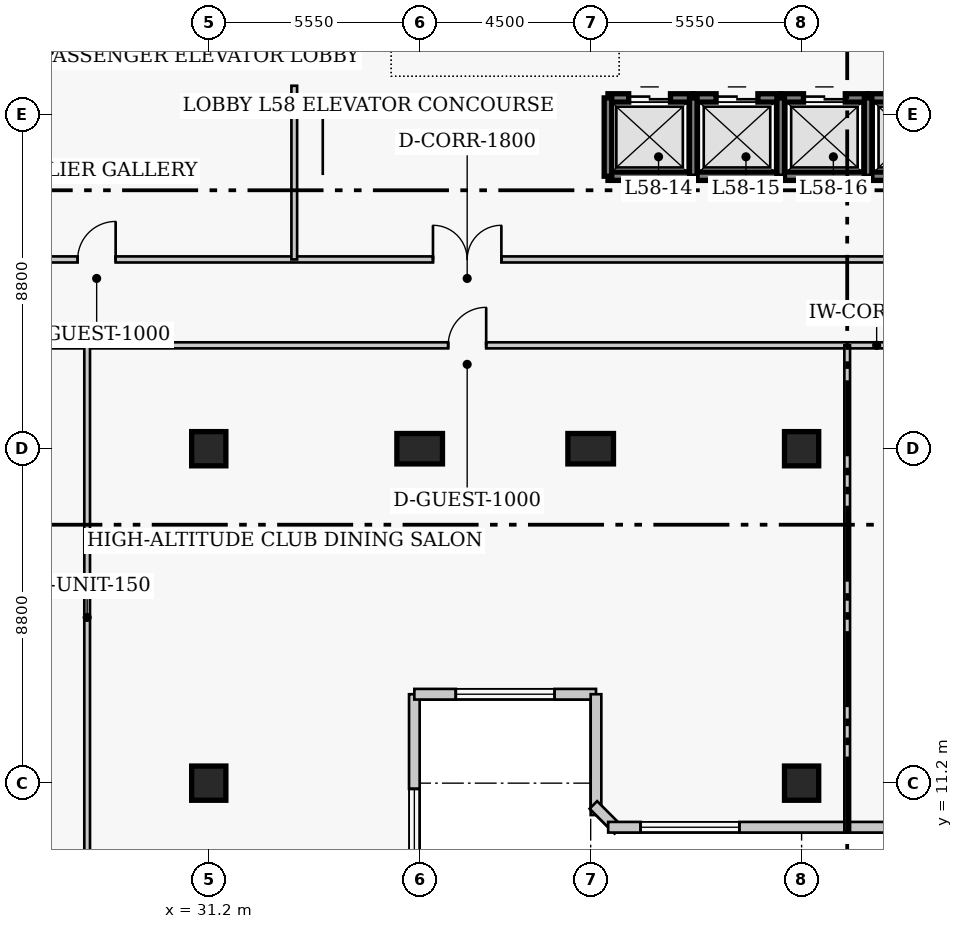
"""IFC4 building model, lengths in metres.
Left out: names, types, materials, properties, quantities, classifications, styles, units other than length and angle.
Written with IfcOpenShell. Run it as: python <this file> out.ifc"""

import sys

from ifc_helpers import new_model, si_unit, direction, frame, frame_2d, origin, origin_2d, place, context, subcontext, project, spatial, rectangle, extrude, element, fill, save


model = new_model("IFC4")
c1 = context("Model", 3, precision=1e-05, world=origin(), true_north=direction((0.0, 1.0)))
c2 = subcontext(c1, "Body", "Model", "MODEL_VIEW")
j1 = project(units=[si_unit("LENGTHUNIT", "METRE"), si_unit("PLANEANGLEUNIT", "RADIAN")], contexts=[c1])
p1 = place(None, origin())
s1 = spatial("IfcSite", under=j1, at=p1, CompositionType="ELEMENT")
p2 = place(p1, origin())
s2 = spatial("IfcBuilding", under=s1, at=p2, CompositionType="ELEMENT")
p3 = place(p2, frame((0.0, 0.0, 231.9)))
s3 = spatial("IfcBuildingStorey", under=s2, at=p3, CompositionType="ELEMENT", Elevation=231.9)
for number, where, z_axis, x_axis in (
    (1, (31.2, 11.2, 0.0), (0.0, 0.0, 1.0), (1.0, 0.0, 0.0)),
    (2, (31.2, 20.0, 0.0), (0.0, 0.0, 1.0), (1.0, 0.0, 0.0)),
):
    element("IfcColumn", number, at=place(p3, frame(where, z_axis=z_axis, x_axis=x_axis)), inside=s3, PredefinedType="COLUMN", context=c2, shape_type="SweptSolid", body=[
        extrude(rectangle(XDim=0.9, YDim=0.9, at=origin_2d()), origin(), (0.0, 0.0, 1.0), 4.6),
    ])
for number, where, z_axis, x_axis in (
    (3, (36.75, 20.0, 0.0), (0.0, 0.0, 1.0), (1.0, 0.0, 0.0)),
    (4, (41.25, 20.0, 0.0), (0.0, 0.0, 1.0), (1.0, 0.0, 0.0)),
):
    element("IfcColumn", number, at=place(p3, frame(where, z_axis=z_axis, x_axis=x_axis)), inside=s3, PredefinedType="COLUMN", context=c2, shape_type="SweptSolid", body=[
        extrude(rectangle(XDim=1.2, YDim=0.8, at=origin_2d()), origin(), (0.0, 0.0, 1.0), 4.6),
    ])
for number, where, z_axis, x_axis in (
    (5, (46.8, 11.2, 0.0), (0.0, 0.0, 1.0), (1.0, 0.0, 0.0)),
    (6, (46.8, 20.0, 0.0), (0.0, 0.0, 1.0), (1.0, 0.0, 0.0)),
):
    element("IfcColumn", number, at=place(p3, frame(where, z_axis=z_axis, x_axis=x_axis)), inside=s3, PredefinedType="COLUMN", context=c2, shape_type="SweptSolid", body=[
        extrude(rectangle(XDim=0.9, YDim=0.9, at=origin_2d()), origin(), (0.0, 0.0, 1.0), 4.6),
    ])
p4 = place(p3, frame((36.61, 5.96, 0.0), z_axis=(0.0, 0.0, 1.0), x_axis=(0.0, 1.0, 0.0)))
e7 = element("IfcWall", 7, at=p4, inside=s3, PredefinedType="SOLIDWALL", context=c2, shape_type="SweptSolid", body=[
    extrude(rectangle(XDim=7.58, YDim=0.28, at=frame_2d((3.79, 0.0))), origin(), (0.0, 0.0, 1.0), 4.35),
])
p5 = place(p4, frame((2.49, 0.0, 0.65)))
e8 = element("IfcOpeningElement", 8, at=p5, cuts=e7, PredefinedType="OPENING", context=c2, shape_type="SweptSolid", body=[
    extrude(rectangle(XDim=2.6, YDim=2.2, at=frame_2d((1.3, 1.1))), frame((0.0, 0.15, 0.0), z_axis=(0.0, -1.0, 0.0), x_axis=(1.0, 0.0, 0.0)), (0.0, 0.0, 1.0), 0.3),
])
p6 = place(p3, frame((36.61, 13.54, 0.0), z_axis=(0.0, 0.0, 1.0), x_axis=(1.0, 0.0, 0.0)))
e9 = element("IfcWall", 9, at=p6, inside=s3, PredefinedType="SOLIDWALL", context=c2, shape_type="SweptSolid", body=[
    extrude(rectangle(XDim=4.78, YDim=0.28, at=frame_2d((2.39, 0.0))), origin(), (0.0, 0.0, 1.0), 4.35),
])
p7 = place(p6, frame((1.09, 0.0, 0.65)))
e10 = element("IfcOpeningElement", 10, at=p7, cuts=e9, PredefinedType="OPENING", context=c2, shape_type="SweptSolid", body=[
    extrude(rectangle(XDim=2.6, YDim=2.2, at=frame_2d((1.3, 1.1))), frame((0.0, 0.15, 0.0), z_axis=(0.0, -1.0, 0.0), x_axis=(1.0, 0.0, 0.0)), (0.0, 0.0, 1.0), 0.3),
])
p8 = place(p3, frame((41.39, 13.54, 0.0), z_axis=(0.0, 0.0, 1.0), x_axis=(0.0, -1.0, 0.0)))
e11 = element("IfcWall", 11, at=p8, inside=s3, PredefinedType="SOLIDWALL", context=c2, shape_type="SweptSolid", body=[
    extrude(rectangle(XDim=3.18, YDim=0.28, at=frame_2d((1.59, 0.0))), origin(), (0.0, 0.0, 1.0), 4.35),
])
p9 = place(p3, frame((41.321, 10.627, 0.0), z_axis=(0.0, 0.0, 1.0), x_axis=(0.707106781187, -0.707106781187, 0.0)))
e12 = element("IfcWall", 12, at=p9, inside=s3, PredefinedType="SOLIDWALL", context=c2, shape_type="SweptSolid", body=[
    extrude(rectangle(XDim=0.928, YDim=0.28, at=frame_2d((0.464, 0.0))), origin(), (0.0, 0.0, 1.0), 4.35),
])
p10 = place(p3, frame((41.71, 10.04, 0.0), z_axis=(0.0, 0.0, 1.0), x_axis=(1.0, 0.0, 0.0)))
e13 = element("IfcWall", 13, at=p10, inside=s3, PredefinedType="SOLIDWALL", context=c2, shape_type="SweptSolid", body=[
    extrude(rectangle(XDim=25.83, YDim=0.28, at=frame_2d((12.915, 0.0))), origin(), (0.0, 0.0, 1.0), 4.35),
])
p11 = place(p10, frame((0.853, 0.0, 0.65)))
e14 = element("IfcOpeningElement", 14, at=p11, cuts=e13, PredefinedType="OPENING", context=c2, shape_type="SweptSolid", body=[
    extrude(rectangle(XDim=2.6, YDim=2.2, at=frame_2d((1.3, 1.1))), frame((0.0, 0.15, 0.0), z_axis=(0.0, -1.0, 0.0), x_axis=(1.0, 0.0, 0.0)), (0.0, 0.0, 1.0), 0.3),
])
p12 = place(p10, frame((9.462, 0.0, 0.65)))
e15 = element("IfcOpeningElement", 15, at=p12, cuts=e13, PredefinedType="OPENING", context=c2, shape_type="SweptSolid", body=[
    extrude(rectangle(XDim=2.6, YDim=2.2, at=frame_2d((1.3, 1.1))), frame((0.0, 0.15, 0.0), z_axis=(0.0, -1.0, 0.0), x_axis=(1.0, 0.0, 0.0)), (0.0, 0.0, 1.0), 0.3),
])
p13 = place(p10, frame((13.768, 0.0, 0.65)))
e16 = element("IfcOpeningElement", 16, at=p13, cuts=e13, PredefinedType="OPENING", context=c2, shape_type="SweptSolid", body=[
    extrude(rectangle(XDim=2.6, YDim=2.2, at=frame_2d((1.3, 1.1))), frame((0.0, 0.15, 0.0), z_axis=(0.0, -1.0, 0.0), x_axis=(1.0, 0.0, 0.0)), (0.0, 0.0, 1.0), 0.3),
])
p14 = place(p10, frame((16.923, 0.0, 0.65)))
e17 = element("IfcOpeningElement", 17, at=p14, cuts=e13, PredefinedType="OPENING", context=c2, shape_type="SweptSolid", body=[
    extrude(rectangle(XDim=2.6, YDim=2.2, at=frame_2d((1.3, 1.1))), frame((0.0, 0.15, 0.0), z_axis=(0.0, -1.0, 0.0), x_axis=(1.0, 0.0, 0.0)), (0.0, 0.0, 1.0), 0.3),
])
p15 = place(p10, frame((22.377, 0.0, 0.65)))
e18 = element("IfcOpeningElement", 18, at=p15, cuts=e13, PredefinedType="OPENING", context=c2, shape_type="SweptSolid", body=[
    extrude(rectangle(XDim=2.6, YDim=2.2, at=frame_2d((1.3, 1.1))), frame((0.0, 0.15, 0.0), z_axis=(0.0, -1.0, 0.0), x_axis=(1.0, 0.0, 0.0)), (0.0, 0.0, 1.0), 0.3),
])
p16 = place(p3, frame((41.705, 29.23, 0.0), z_axis=(0.0, 0.0, 1.0), x_axis=(1.0, 0.0, 0.0)))
e19 = element("IfcWall", 19, at=p16, inside=s3, PredefinedType="SHEAR", context=c2, shape_type="SweptSolid", body=[
    extrude(rectangle(XDim=2.245, YDim=0.22, at=frame_2d((1.123, 0.0))), origin(), (0.0, 0.0, 1.0), 4.6),
])
p17 = place(p16, frame((0.545, 0.0, 0.0)))
e20 = element("IfcOpeningElement", 20, at=p17, cuts=e19, PredefinedType="OPENING", context=c2, shape_type="SweptSolid", body=[
    extrude(rectangle(XDim=1.1, YDim=2.15, at=frame_2d((0.55, 1.075))), frame((0.0, 0.12, 0.0), z_axis=(0.0, -1.0, 0.0), x_axis=(1.0, 0.0, 0.0)), (0.0, 0.0, 1.0), 0.24),
])
p18 = place(p3, frame((41.705, 27.17, 0.0), z_axis=(0.0, 0.0, 1.0), x_axis=(1.0, 0.0, 0.0)))
e21 = element("IfcWall", 21, at=p18, inside=s3, PredefinedType="SHEAR", context=c2, shape_type="SweptSolid", body=[
    extrude(rectangle(XDim=2.245, YDim=0.22, at=frame_2d((1.123, 0.0))), origin(), (0.0, 0.0, 1.0), 4.6),
])
p19 = place(p3, frame((41.705, 27.17, 0.0), z_axis=(0.0, 0.0, 1.0), x_axis=(0.0, 1.0, 0.0)))
e22 = element("IfcWall", 22, at=p19, inside=s3, PredefinedType="SHEAR", context=c2, shape_type="SweptSolid", body=[
    extrude(rectangle(XDim=2.06, YDim=0.2, at=frame_2d((1.03, 0.0))), origin(), (0.0, 0.0, 1.0), 4.6),
])
p20 = place(p3, frame((43.95, 29.23, 0.0), z_axis=(0.0, 0.0, 1.0), x_axis=(1.0, 0.0, 0.0)))
e23 = element("IfcWall", 23, at=p20, inside=s3, PredefinedType="SHEAR", context=c2, shape_type="SweptSolid", body=[
    extrude(rectangle(XDim=2.3, YDim=0.22, at=frame_2d((1.15, 0.0))), origin(), (0.0, 0.0, 1.0), 4.6),
])
p21 = place(p20, frame((0.6, 0.0, 0.0)))
e24 = element("IfcOpeningElement", 24, at=p21, cuts=e23, PredefinedType="OPENING", context=c2, shape_type="SweptSolid", body=[
    extrude(rectangle(XDim=1.1, YDim=2.15, at=frame_2d((0.55, 1.075))), frame((0.0, 0.12, 0.0), z_axis=(0.0, -1.0, 0.0), x_axis=(1.0, 0.0, 0.0)), (0.0, 0.0, 1.0), 0.24),
])
p22 = place(p3, frame((43.95, 27.17, 0.0), z_axis=(0.0, 0.0, 1.0), x_axis=(1.0, 0.0, 0.0)))
e25 = element("IfcWall", 25, at=p22, inside=s3, PredefinedType="SHEAR", context=c2, shape_type="SweptSolid", body=[
    extrude(rectangle(XDim=2.3, YDim=0.22, at=frame_2d((1.15, 0.0))), origin(), (0.0, 0.0, 1.0), 4.6),
])
p23 = place(p3, frame((43.95, 27.17, 0.0), z_axis=(0.0, 0.0, 1.0), x_axis=(0.0, 1.0, 0.0)))
e26 = element("IfcWall", 26, at=p23, inside=s3, PredefinedType="SHEAR", context=c2, shape_type="SweptSolid", body=[
    extrude(rectangle(XDim=2.06, YDim=0.2, at=frame_2d((1.03, 0.0))), origin(), (0.0, 0.0, 1.0), 4.6),
])
p24 = place(p3, frame((46.25, 29.23, 0.0), z_axis=(0.0, 0.0, 1.0), x_axis=(1.0, 0.0, 0.0)))
e27 = element("IfcWall", 27, at=p24, inside=s3, PredefinedType="SHEAR", context=c2, shape_type="SweptSolid", body=[
    extrude(rectangle(XDim=2.3, YDim=0.22, at=frame_2d((1.15, 0.0))), origin(), (0.0, 0.0, 1.0), 4.6),
])
p25 = place(p24, frame((0.6, 0.0, 0.0)))
e28 = element("IfcOpeningElement", 28, at=p25, cuts=e27, PredefinedType="OPENING", context=c2, shape_type="SweptSolid", body=[
    extrude(rectangle(XDim=1.1, YDim=2.15, at=frame_2d((0.55, 1.075))), frame((0.0, 0.12, 0.0), z_axis=(0.0, -1.0, 0.0), x_axis=(1.0, 0.0, 0.0)), (0.0, 0.0, 1.0), 0.24),
])
p26 = place(p3, frame((46.25, 27.17, 0.0), z_axis=(0.0, 0.0, 1.0), x_axis=(1.0, 0.0, 0.0)))
e29 = element("IfcWall", 29, at=p26, inside=s3, PredefinedType="SHEAR", context=c2, shape_type="SweptSolid", body=[
    extrude(rectangle(XDim=2.3, YDim=0.22, at=frame_2d((1.15, 0.0))), origin(), (0.0, 0.0, 1.0), 4.6),
])
p27 = place(p3, frame((46.25, 27.17, 0.0), z_axis=(0.0, 0.0, 1.0), x_axis=(0.0, 1.0, 0.0)))
e30 = element("IfcWall", 30, at=p27, inside=s3, PredefinedType="SHEAR", context=c2, shape_type="SweptSolid", body=[
    extrude(rectangle(XDim=2.06, YDim=0.2, at=frame_2d((1.03, 0.0))), origin(), (0.0, 0.0, 1.0), 4.6),
])
p28 = place(p3, frame((48.55, 29.23, 0.0), z_axis=(0.0, 0.0, 1.0), x_axis=(1.0, 0.0, 0.0)))
e31 = element("IfcWall", 31, at=p28, inside=s3, PredefinedType="SHEAR", context=c2, shape_type="SweptSolid", body=[
    extrude(rectangle(XDim=2.245, YDim=0.22, at=frame_2d((1.123, 0.0))), origin(), (0.0, 0.0, 1.0), 4.6),
])
p29 = place(p28, frame((0.6, 0.0, 0.0)))
e32 = element("IfcOpeningElement", 32, at=p29, cuts=e31, PredefinedType="OPENING", context=c2, shape_type="SweptSolid", body=[
    extrude(rectangle(XDim=1.1, YDim=2.15, at=frame_2d((0.55, 1.075))), frame((0.0, 0.12, 0.0), z_axis=(0.0, -1.0, 0.0), x_axis=(1.0, 0.0, 0.0)), (0.0, 0.0, 1.0), 0.24),
])
p30 = place(p3, frame((48.55, 27.17, 0.0), z_axis=(0.0, 0.0, 1.0), x_axis=(1.0, 0.0, 0.0)))
e33 = element("IfcWall", 33, at=p30, inside=s3, PredefinedType="SHEAR", context=c2, shape_type="SweptSolid", body=[
    extrude(rectangle(XDim=2.245, YDim=0.22, at=frame_2d((1.123, 0.0))), origin(), (0.0, 0.0, 1.0), 4.6),
])
p31 = place(p3, frame((48.55, 27.17, 0.0), z_axis=(0.0, 0.0, 1.0), x_axis=(0.0, 1.0, 0.0)))
e34 = element("IfcWall", 34, at=p31, inside=s3, PredefinedType="SHEAR", context=c2, shape_type="SweptSolid", body=[
    extrude(rectangle(XDim=2.06, YDim=0.2, at=frame_2d((1.03, 0.0))), origin(), (0.0, 0.0, 1.0), 4.6),
])
p32 = place(p3, frame((6.7, 22.72, 0.0), z_axis=(0.0, 0.0, 1.0), x_axis=(1.0, 0.0, 0.0)))
e35 = element("IfcWall", 35, at=p32, inside=s3, PredefinedType="PARTITIONING", context=c2, shape_type="SweptSolid", body=[
    extrude(rectangle(XDim=64.6, YDim=0.16, at=frame_2d((32.3, 0.0))), origin(), (0.0, 0.0, 1.0), 4.35),
])
p33 = place(p32, frame((10.25, 0.0, 0.0)))
e36 = element("IfcOpeningElement", 36, at=p33, cuts=e35, PredefinedType="OPENING", context=c2, shape_type="SweptSolid", body=[
    extrude(rectangle(XDim=1.0, YDim=2.15, at=frame_2d((0.5, 1.075))), frame((0.0, 0.09, 0.0), z_axis=(0.0, -1.0, 0.0), x_axis=(1.0, 0.0, 0.0)), (0.0, 0.0, 1.0), 0.18),
])
p34 = place(p32, frame((30.8, 0.0, 0.0)))
e37 = element("IfcOpeningElement", 37, at=p34, cuts=e35, PredefinedType="OPENING", context=c2, shape_type="SweptSolid", body=[
    extrude(rectangle(XDim=1.0, YDim=2.15, at=frame_2d((0.5, 1.075))), frame((0.0, 0.09, 0.0), z_axis=(0.0, -1.0, 0.0), x_axis=(1.0, 0.0, 0.0)), (0.0, 0.0, 1.0), 0.18),
])
p35 = place(p32, frame((52.35, 0.0, 0.0)))
e38 = element("IfcOpeningElement", 38, at=p35, cuts=e35, PredefinedType="OPENING", context=c2, shape_type="SweptSolid", body=[
    extrude(rectangle(XDim=1.0, YDim=2.15, at=frame_2d((0.5, 1.075))), frame((0.0, 0.09, 0.0), z_axis=(0.0, -1.0, 0.0), x_axis=(1.0, 0.0, 0.0)), (0.0, 0.0, 1.0), 0.18),
])
p36 = place(p3, frame((6.7, 24.98, 0.0), z_axis=(0.0, 0.0, 1.0), x_axis=(1.0, 0.0, 0.0)))
e39 = element("IfcWall", 39, at=p36, inside=s3, PredefinedType="PARTITIONING", context=c2, shape_type="SweptSolid", body=[
    extrude(rectangle(XDim=64.6, YDim=0.16, at=frame_2d((32.3, 0.0))), origin(), (0.0, 0.0, 1.0), 4.35),
])
p37 = place(p36, frame((30.4, 0.0, 0.0)))
e40 = element("IfcOpeningElement", 40, at=p37, cuts=e39, PredefinedType="OPENING", context=c2, shape_type="SweptSolid", body=[
    extrude(rectangle(XDim=1.8, YDim=2.2, at=frame_2d((0.9, 1.1))), frame((0.0, 0.09, 0.0), z_axis=(0.0, -1.0, 0.0), x_axis=(1.0, 0.0, 0.0)), (0.0, 0.0, 1.0), 0.18),
])
p38 = place(p36, frame((21.05, 0.0, 0.0)))
e41 = element("IfcOpeningElement", 41, at=p38, cuts=e39, PredefinedType="OPENING", context=c2, shape_type="SweptSolid", body=[
    extrude(rectangle(XDim=1.0, YDim=2.15, at=frame_2d((0.5, 1.075))), frame((0.0, 0.09, 0.0), z_axis=(0.0, -1.0, 0.0), x_axis=(1.0, 0.0, 0.0)), (0.0, 0.0, 1.0), 0.18),
])
p39 = place(p36, frame((7.05, 0.0, 0.0)))
e42 = element("IfcOpeningElement", 42, at=p39, cuts=e39, PredefinedType="OPENING", context=c2, shape_type="SweptSolid", body=[
    extrude(rectangle(XDim=1.0, YDim=2.15, at=frame_2d((0.5, 1.075))), frame((0.0, 0.09, 0.0), z_axis=(0.0, -1.0, 0.0), x_axis=(1.0, 0.0, 0.0)), (0.0, 0.0, 1.0), 0.18),
])
p40 = place(p36, frame((51.91, 0.0, 0.0)))
e43 = element("IfcOpeningElement", 43, at=p40, cuts=e39, PredefinedType="OPENING", context=c2, shape_type="SweptSolid", body=[
    extrude(rectangle(XDim=0.88, YDim=2.05, at=frame_2d((0.44, 1.025))), frame((0.0, 0.09, 0.0), z_axis=(0.0, -1.0, 0.0), x_axis=(1.0, 0.0, 0.0)), (0.0, 0.0, 1.0), 0.18),
])
p41 = place(p36, frame((54.15, 0.0, 0.0)))
e44 = element("IfcOpeningElement", 44, at=p41, cuts=e39, PredefinedType="OPENING", context=c2, shape_type="SweptSolid", body=[
    extrude(rectangle(XDim=1.0, YDim=2.15, at=frame_2d((0.5, 1.075))), frame((0.0, 0.09, 0.0), z_axis=(0.0, -1.0, 0.0), x_axis=(1.0, 0.0, 0.0)), (0.0, 0.0, 1.0), 0.18),
])
p42 = place(p3, frame((33.45, 24.98, 0.0), z_axis=(0.0, 0.0, 1.0), x_axis=(0.0, 1.0, 0.0)))
e45 = element("IfcWall", 45, at=p42, inside=s3, PredefinedType="PARTITIONING", context=c2, shape_type="SweptSolid", body=[
    extrude(rectangle(XDim=4.57, YDim=0.15, at=frame_2d((2.285, 0.0))), origin(), (0.0, 0.0, 1.0), 4.35),
])
p43 = place(p3, frame((28.0, 8.4, 0.0), z_axis=(0.0, 0.0, 1.0), x_axis=(0.0, 1.0, 0.0)))
e46 = element("IfcWall", 46, at=p43, inside=s3, PredefinedType="PARTITIONING", context=c2, shape_type="SweptSolid", body=[
    extrude(rectangle(XDim=14.32, YDim=0.15, at=frame_2d((7.16, 0.0))), origin(), (0.0, 0.0, 1.0), 3.946),
])
p44 = place(p3, frame((48.0, 9.92, 0.0), z_axis=(0.0, 0.0, 1.0), x_axis=(0.0, 1.0, 0.0)))
e47 = element("IfcWall", 47, at=p44, inside=s3, PredefinedType="PARTITIONING", context=c2, shape_type="SweptSolid", body=[
    extrude(rectangle(XDim=12.8, YDim=0.15, at=frame_2d((6.4, 0.0))), origin(), (0.0, 0.0, 1.0), 4.35),
])
p45 = place(p5, origin())
e48 = element("IfcWindow", 48, at=p45, inside=s3, PartitioningType="SINGLE_PANEL", PredefinedType="WINDOW", context=c2, shape_type="SweptSolid", body=[
    extrude(rectangle(XDim=2.6, YDim=2.2, at=frame_2d((1.3, 1.1))), frame((0.0, 0.03, 0.0), z_axis=(0.0, -1.0, 0.0), x_axis=(1.0, 0.0, 0.0)), (0.0, 0.0, 1.0), 0.06),
])
fill(e8, e48)
p46 = place(p7, origin())
e49 = element("IfcWindow", 49, at=p46, inside=s3, PartitioningType="SINGLE_PANEL", PredefinedType="WINDOW", context=c2, shape_type="SweptSolid", body=[
    extrude(rectangle(XDim=2.6, YDim=2.2, at=frame_2d((1.3, 1.1))), frame((0.0, 0.03, 0.0), z_axis=(0.0, -1.0, 0.0), x_axis=(1.0, 0.0, 0.0)), (0.0, 0.0, 1.0), 0.06),
])
fill(e10, e49)
p47 = place(p11, origin())
e50 = element("IfcWindow", 50, at=p47, inside=s3, PartitioningType="SINGLE_PANEL", PredefinedType="WINDOW", context=c2, shape_type="SweptSolid", body=[
    extrude(rectangle(XDim=2.6, YDim=2.2, at=frame_2d((1.3, 1.1))), frame((0.0, 0.03, 0.0), z_axis=(0.0, -1.0, 0.0), x_axis=(1.0, 0.0, 0.0)), (0.0, 0.0, 1.0), 0.06),
])
fill(e14, e50)
p48 = place(p17, origin())
e51 = element("IfcDoor", 51, at=p48, inside=s3, OperationType="DOUBLE_DOOR_SLIDING", PredefinedType="DOOR", context=c2, shape_type="SweptSolid", body=[
    extrude(rectangle(XDim=1.1, YDim=2.15, at=frame_2d((0.55, 1.075))), frame((0.0, 0.025, 0.0), z_axis=(0.0, -1.0, 0.0), x_axis=(1.0, 0.0, 0.0)), (0.0, 0.0, 1.0), 0.05),
])
fill(e20, e51)
p49 = place(p21, origin())
e52 = element("IfcDoor", 52, at=p49, inside=s3, OperationType="DOUBLE_DOOR_SLIDING", PredefinedType="DOOR", context=c2, shape_type="SweptSolid", body=[
    extrude(rectangle(XDim=1.1, YDim=2.15, at=frame_2d((0.55, 1.075))), frame((0.0, 0.025, 0.0), z_axis=(0.0, -1.0, 0.0), x_axis=(1.0, 0.0, 0.0)), (0.0, 0.0, 1.0), 0.05),
])
fill(e24, e52)
p50 = place(p25, origin())
e53 = element("IfcDoor", 53, at=p50, inside=s3, OperationType="DOUBLE_DOOR_SLIDING", PredefinedType="DOOR", context=c2, shape_type="SweptSolid", body=[
    extrude(rectangle(XDim=1.1, YDim=2.15, at=frame_2d((0.55, 1.075))), frame((0.0, 0.025, 0.0), z_axis=(0.0, -1.0, 0.0), x_axis=(1.0, 0.0, 0.0)), (0.0, 0.0, 1.0), 0.05),
])
fill(e28, e53)
p51 = place(p37, origin())
e54 = element("IfcDoor", 54, at=p51, inside=s3, OperationType="DOUBLE_DOOR_SINGLE_SWING", PredefinedType="DOOR", context=c2, shape_type="SweptSolid", body=[
    extrude(rectangle(XDim=1.8, YDim=2.2, at=frame_2d((0.9, 1.1))), frame((0.0, 0.025, 0.0), z_axis=(0.0, -1.0, 0.0), x_axis=(1.0, 0.0, 0.0)), (0.0, 0.0, 1.0), 0.05),
])
fill(e40, e54)
p52 = place(p38, origin())
e55 = element("IfcDoor", 55, at=p52, inside=s3, OperationType="SINGLE_SWING_RIGHT", PredefinedType="DOOR", context=c2, shape_type="SweptSolid", body=[
    extrude(rectangle(XDim=1.0, YDim=2.15, at=frame_2d((0.5, 1.075))), frame((0.0, 0.025, 0.0), z_axis=(0.0, -1.0, 0.0), x_axis=(1.0, 0.0, 0.0)), (0.0, 0.0, 1.0), 0.05),
])
fill(e41, e55)
p53 = place(p34, origin())
e56 = element("IfcDoor", 56, at=p53, inside=s3, OperationType="SINGLE_SWING_RIGHT", PredefinedType="DOOR", context=c2, shape_type="SweptSolid", body=[
    extrude(rectangle(XDim=1.0, YDim=2.15, at=frame_2d((0.5, 1.075))), frame((0.0, 0.025, 0.0), z_axis=(0.0, -1.0, 0.0), x_axis=(1.0, 0.0, 0.0)), (0.0, 0.0, 1.0), 0.05),
])
fill(e37, e56)
save(model, sys.argv[1])
